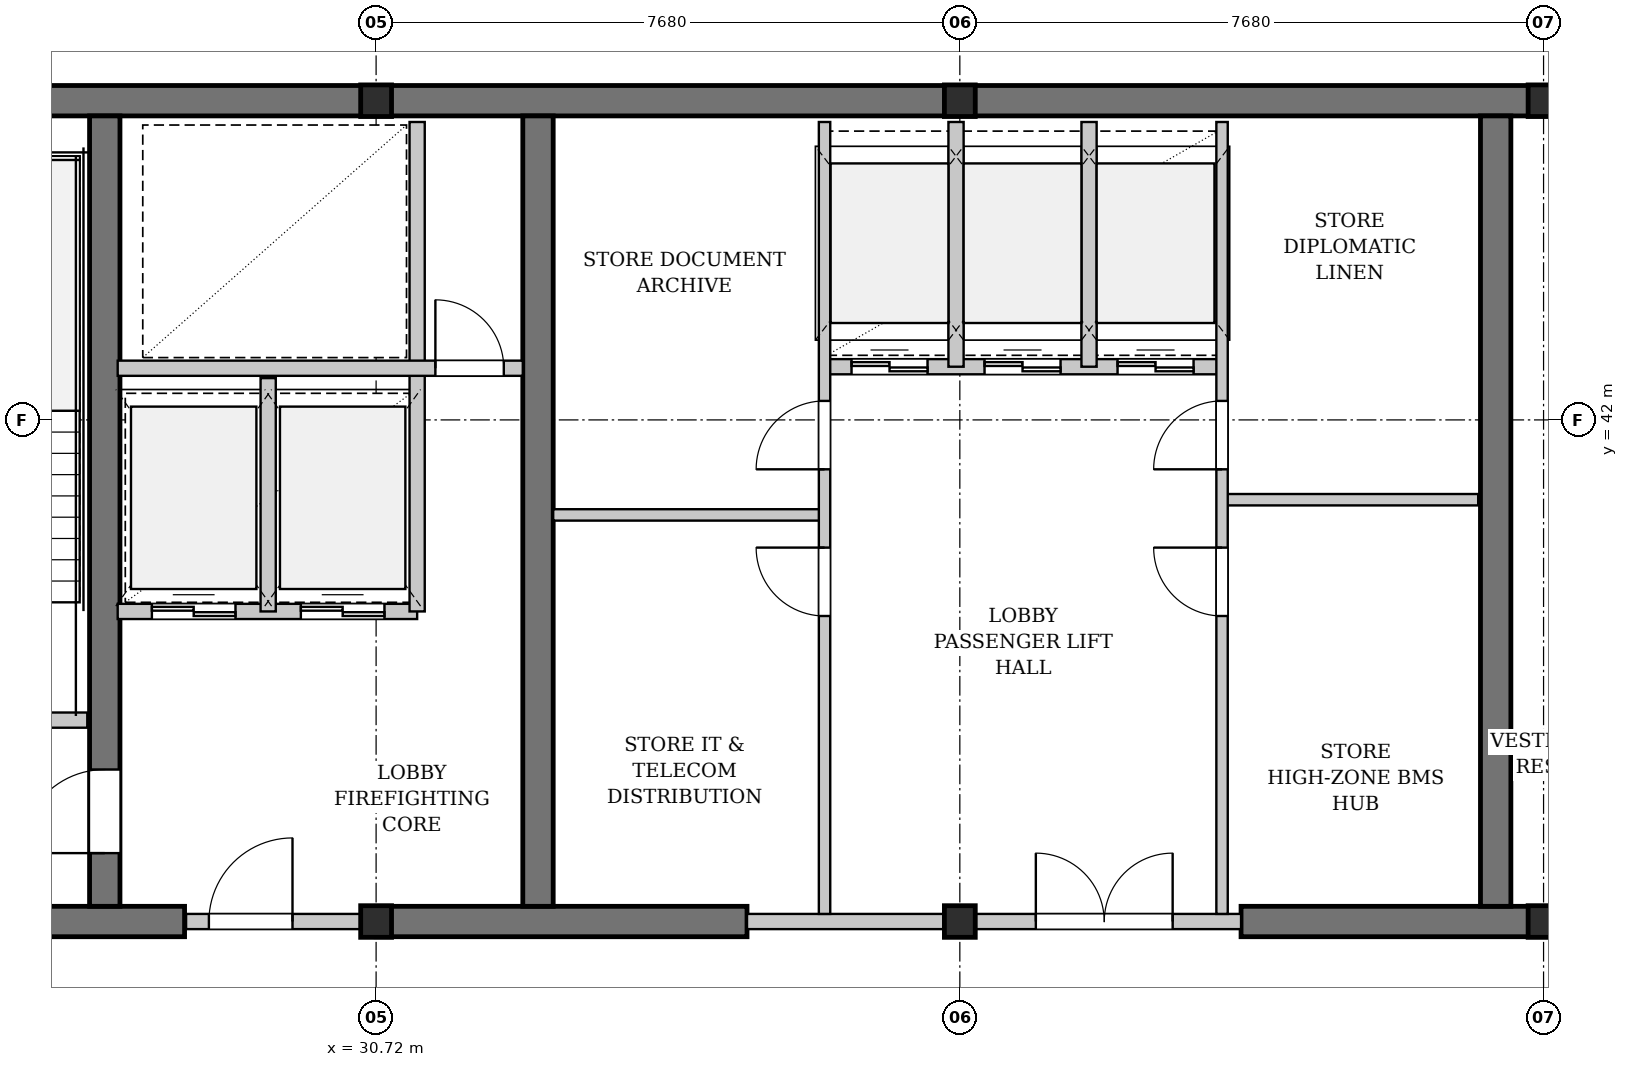
"""IFC4 building model, lengths in metres.
Left out: names, types, materials, properties, quantities, classifications, styles, units other than length and angle.
Written with IfcOpenShell. Run it as: python <this file> out.ifc"""

import sys

from ifc_helpers import new_model, si_unit, direction, frame, frame_2d, origin, origin_2d, place, context, subcontext, project, spatial, rectangle, i_section, extrude, element, fill, save


model = new_model("IFC4")
c1 = context("Model", 3, precision=1e-05, world=origin(), true_north=direction((0.0, 1.0)))
c2 = subcontext(c1, "Body", "Model", "MODEL_VIEW")
j1 = project(units=[si_unit("LENGTHUNIT", "METRE"), si_unit("PLANEANGLEUNIT", "RADIAN")], contexts=[c1])
p1 = place(None, origin())
s1 = spatial("IfcSite", under=j1, at=p1, CompositionType="ELEMENT")
p2 = place(p1, origin())
s2 = spatial("IfcBuilding", under=s1, at=p2, CompositionType="ELEMENT")
p3 = place(p2, frame((0.0, 0.0, 265.9)))
s3 = spatial("IfcBuildingStorey", under=s2, at=p3, CompositionType="ELEMENT", Elevation=265.9)
p4 = place(p3, frame((22.84, 46.2, 0.0), z_axis=(0.0, 0.0, 1.0), x_axis=(1.0, 0.0, 0.0)))
e1 = element("IfcWall", 1, at=p4, inside=s3, PredefinedType="SHEAR", context=c2, shape_type="SweptSolid", body=[
    extrude(rectangle(XDim=31.12, YDim=0.4, at=frame_2d((15.56, 0.0))), origin(), (0.0, 0.0, 1.0), 3.18),
])
p5 = place(p3, frame((22.84, 35.4, 0.0), z_axis=(0.0, 0.0, 1.0), x_axis=(1.0, 0.0, 0.0)))
e2 = element("IfcWall", 2, at=p5, inside=s3, PredefinedType="SHEAR", context=c2, shape_type="SweptSolid", body=[
    extrude(rectangle(XDim=5.36, YDim=0.4, at=frame_2d((2.68, 0.0))), origin(), (0.0, 0.0, 1.0), 3.18),
])
p6 = place(p3, frame((30.72, 35.4, 0.0), z_axis=(0.0, 0.0, 1.0), x_axis=(1.0, 0.0, 0.0)))
e3 = element("IfcWall", 3, at=p6, inside=s3, PredefinedType="SHEAR", context=c2, shape_type="SweptSolid", body=[
    extrude(rectangle(XDim=4.88, YDim=0.4, at=frame_2d((2.44, 0.0))), origin(), (0.0, 0.0, 1.0), 3.18),
])
p7 = place(p3, frame((42.1, 35.4, 0.0), z_axis=(0.0, 0.0, 1.0), x_axis=(1.0, 0.0, 0.0)))
e4 = element("IfcWall", 4, at=p7, inside=s3, PredefinedType="SHEAR", context=c2, shape_type="SweptSolid", body=[
    extrude(rectangle(XDim=8.05, YDim=0.4, at=frame_2d((4.025, 0.0))), origin(), (0.0, 0.0, 1.0), 3.18),
])
p8 = place(p7, frame((4.85, 0.0, 0.0)))
e5 = element("IfcOpeningElement", 5, at=p8, cuts=e4, PredefinedType="OPENING", context=c2, shape_type="SweptSolid", body=[
    extrude(rectangle(XDim=0.9, YDim=2.15, at=frame_2d((0.45, 1.075))), frame((0.0, 0.21, 0.0), z_axis=(0.0, -1.0, 0.0), x_axis=(1.0, 0.0, 0.0)), (0.0, 0.0, 1.0), 0.42),
])
p9 = place(p3, frame((27.15, 35.6, 0.0), z_axis=(0.0, 0.0, 1.0), x_axis=(0.0, 1.0, 0.0)))
e6 = element("IfcWall", 6, at=p9, inside=s3, PredefinedType="SHEAR", context=c2, shape_type="SweptSolid", body=[
    extrude(rectangle(XDim=10.4, YDim=0.4, at=frame_2d((5.2, 0.0))), origin(), (0.0, 0.0, 1.0), 3.18),
])
p10 = place(p9, frame((0.7, 0.0, 0.0)))
e7 = element("IfcOpeningElement", 7, at=p10, cuts=e6, PredefinedType="OPENING", context=c2, shape_type="SweptSolid", body=[
    extrude(rectangle(XDim=1.1, YDim=2.15, at=frame_2d((0.55, 1.075))), frame((0.0, 0.21, 0.0), z_axis=(0.0, -1.0, 0.0), x_axis=(1.0, 0.0, 0.0)), (0.0, 0.0, 1.0), 0.42),
])
for number, where, z_axis, x_axis in (
    (8, (32.85, 35.6, 0.0), (0.0, 0.0, 1.0), (0.0, 1.0, 0.0)),
    (9, (45.45, 35.6, 0.0), (0.0, 0.0, 1.0), (0.0, 1.0, 0.0)),
):
    element("IfcWall", number, at=place(p3, frame(where, z_axis=z_axis, x_axis=x_axis)), inside=s3, PredefinedType="SHEAR", context=c2, shape_type="SweptSolid", body=[
        extrude(rectangle(XDim=10.4, YDim=0.4, at=frame_2d((5.2, 0.0))), origin(), (0.0, 0.0, 1.0), 3.18),
    ])
for number, where, z_axis, x_axis in (
    (10, (30.72, 35.4, 0.0), (0.0, 0.0, 1.0), (1.0, 0.0, 0.0)),
    (11, (30.72, 46.2, 0.0), (0.0, 0.0, 1.0), (1.0, 0.0, 0.0)),
    (12, (38.4, 35.4, 0.0), (0.0, 0.0, 1.0), (1.0, 0.0, 0.0)),
    (13, (38.4, 46.2, 0.0), (0.0, 0.0, 1.0), (1.0, 0.0, 0.0)),
    (14, (46.08, 35.4, 0.0), (0.0, 0.0, 1.0), (1.0, 0.0, 0.0)),
    (15, (46.08, 46.2, 0.0), (0.0, 0.0, 1.0), (1.0, 0.0, 0.0)),
):
    element("IfcColumn", number, at=place(p3, frame(where, z_axis=z_axis, x_axis=x_axis)), inside=s3, PredefinedType="COLUMN", context=c2, shape_type="SweptSolid", body=[
        extrude(i_section(OverallWidth=0.406, OverallDepth=0.416, WebThickness=0.03, FlangeThickness=0.048, FilletRadius=0.015, at=origin_2d()), origin(), (0.0, 0.0, 1.0), 3.4),
    ])
p11 = place(p3, frame((23.3, 38.05, 0.0), z_axis=(0.0, 0.0, 1.0), x_axis=(1.0, 0.0, 0.0)))
e16 = element("IfcWall", 16, at=p11, inside=s3, PredefinedType="PARTITIONING", context=c2, shape_type="SweptSolid", body=[
    extrude(rectangle(XDim=3.62, YDim=0.2, at=frame_2d((1.81, 0.0))), origin(), (0.0, 0.0, 1.0), 3.18),
])
p12 = place(p11, frame((1.26, 0.0, 0.0)))
e17 = element("IfcOpeningElement", 17, at=p12, cuts=e16, PredefinedType="OPENING", context=c2, shape_type="SweptSolid", body=[
    extrude(rectangle(XDim=1.1, YDim=2.15, at=frame_2d((0.55, 1.075))), frame((0.0, 0.11, 0.0), z_axis=(0.0, -1.0, 0.0), x_axis=(1.0, 0.0, 0.0)), (0.0, 0.0, 1.0), 0.22),
])
p13 = place(p3, frame((28.22, 35.4, 0.0), z_axis=(0.0, 0.0, 1.0), x_axis=(1.0, 0.0, 0.0)))
e18 = element("IfcWall", 18, at=p13, inside=s3, PredefinedType="PARTITIONING", context=c2, shape_type="SweptSolid", body=[
    extrude(rectangle(XDim=2.5, YDim=0.2, at=frame_2d((1.25, 0.0))), origin(), (0.0, 0.0, 1.0), 2.575),
])
p14 = place(p13, frame((0.3, 0.0, 0.0)))
e19 = element("IfcOpeningElement", 19, at=p14, cuts=e18, PredefinedType="OPENING", context=c2, shape_type="SweptSolid", body=[
    extrude(rectangle(XDim=1.1, YDim=2.15, at=frame_2d((0.55, 1.075))), frame((0.0, 0.11, 0.0), z_axis=(0.0, -1.0, 0.0), x_axis=(1.0, 0.0, 0.0)), (0.0, 0.0, 1.0), 0.22),
])
p15 = place(p3, frame((27.32, 39.48, 0.0), z_axis=(0.0, 0.0, 1.0), x_axis=(1.0, 0.0, 0.0)))
e20 = element("IfcWall", 20, at=p15, inside=s3, PredefinedType="PARTITIONING", context=c2, shape_type="SweptSolid", body=[
    extrude(rectangle(XDim=3.94, YDim=0.2, at=frame_2d((1.97, 0.0))), origin(), (0.0, 0.0, 1.0), 3.18),
])
p16 = place(p15, frame((0.45, 0.0, 0.0)))
e21 = element("IfcOpeningElement", 21, at=p16, cuts=e20, PredefinedType="OPENING", context=c2, shape_type="SweptSolid", body=[
    extrude(rectangle(XDim=1.1, YDim=2.2, at=frame_2d((0.55, 1.1))), frame((0.0, 0.11, 0.0), z_axis=(0.0, -1.0, 0.0), x_axis=(1.0, 0.0, 0.0)), (0.0, 0.0, 1.0), 0.22),
])
p17 = place(p15, frame((2.41, 0.0, 0.0)))
e22 = element("IfcOpeningElement", 22, at=p17, cuts=e20, PredefinedType="OPENING", context=c2, shape_type="SweptSolid", body=[
    extrude(rectangle(XDim=1.1, YDim=2.2, at=frame_2d((0.55, 1.1))), frame((0.0, 0.11, 0.0), z_axis=(0.0, -1.0, 0.0), x_axis=(1.0, 0.0, 0.0)), (0.0, 0.0, 1.0), 0.22),
])
p18 = place(p3, frame((29.3, 39.48, 0.0), z_axis=(0.0, 0.0, 1.0), x_axis=(0.0, 1.0, 0.0)))
e23 = element("IfcWall", 23, at=p18, inside=s3, PredefinedType="PARTITIONING", context=c2, shape_type="SweptSolid", body=[
    extrude(rectangle(XDim=3.07, YDim=0.2, at=frame_2d((1.535, 0.0))), origin(), (0.0, 0.0, 1.0), 3.18),
])
p19 = place(p3, frame((31.26, 39.48, 0.0), z_axis=(0.0, 0.0, 1.0), x_axis=(0.0, 1.0, 0.0)))
e24 = element("IfcWall", 24, at=p19, inside=s3, PredefinedType="PARTITIONING", context=c2, shape_type="SweptSolid", body=[
    extrude(rectangle(XDim=6.44, YDim=0.2, at=frame_2d((3.22, 0.0))), origin(), (0.0, 0.0, 1.0), 3.18),
])
p20 = place(p3, frame((27.32, 42.68, 0.0), z_axis=(0.0, 0.0, 1.0), x_axis=(1.0, 0.0, 0.0)))
e25 = element("IfcWall", 25, at=p20, inside=s3, PredefinedType="PARTITIONING", context=c2, shape_type="SweptSolid", body=[
    extrude(rectangle(XDim=5.33, YDim=0.2, at=frame_2d((2.665, 0.0))), origin(), (0.0, 0.0, 1.0), 3.18),
])
p21 = place(p20, frame((4.18, 0.0, 0.0)))
e26 = element("IfcOpeningElement", 26, at=p21, cuts=e25, PredefinedType="OPENING", context=c2, shape_type="SweptSolid", body=[
    extrude(rectangle(XDim=0.9, YDim=2.15, at=frame_2d((0.45, 1.075))), frame((0.0, 0.11, 0.0), z_axis=(0.0, -1.0, 0.0), x_axis=(1.0, 0.0, 0.0)), (0.0, 0.0, 1.0), 0.22),
])
p22 = place(p3, frame((35.6, 35.4, 0.0), z_axis=(0.0, 0.0, 1.0), x_axis=(1.0, 0.0, 0.0)))
e27 = element("IfcWall", 27, at=p22, inside=s3, PredefinedType="PARTITIONING", context=c2, shape_type="SweptSolid", body=[
    extrude(rectangle(XDim=6.5, YDim=0.2, at=frame_2d((3.25, 0.0))), origin(), (0.0, 0.0, 1.0), 2.575),
])
p23 = place(p22, frame((3.8, 0.0, 0.0)))
e28 = element("IfcOpeningElement", 28, at=p23, cuts=e27, PredefinedType="OPENING", context=c2, shape_type="SweptSolid", body=[
    extrude(rectangle(XDim=1.8, YDim=2.3, at=frame_2d((0.9, 1.15))), frame((0.0, 0.11, 0.0), z_axis=(0.0, -1.0, 0.0), x_axis=(1.0, 0.0, 0.0)), (0.0, 0.0, 1.0), 0.22),
])
p24 = place(p3, frame((36.6, 42.7, 0.0), z_axis=(0.0, 0.0, 1.0), x_axis=(1.0, 0.0, 0.0)))
e29 = element("IfcWall", 29, at=p24, inside=s3, PredefinedType="PARTITIONING", context=c2, shape_type="SweptSolid", body=[
    extrude(rectangle(XDim=5.25, YDim=0.2, at=frame_2d((2.625, 0.0))), origin(), (0.0, 0.0, 1.0), 3.18),
])
p25 = place(p24, frame((0.375, 0.0, 0.0)))
e30 = element("IfcOpeningElement", 30, at=p25, cuts=e29, PredefinedType="OPENING", context=c2, shape_type="SweptSolid", body=[
    extrude(rectangle(XDim=1.0, YDim=2.2, at=frame_2d((0.5, 1.1))), frame((0.0, 0.11, 0.0), z_axis=(0.0, -1.0, 0.0), x_axis=(1.0, 0.0, 0.0)), (0.0, 0.0, 1.0), 0.22),
])
p26 = place(p24, frame((2.125, 0.0, 0.0)))
e31 = element("IfcOpeningElement", 31, at=p26, cuts=e29, PredefinedType="OPENING", context=c2, shape_type="SweptSolid", body=[
    extrude(rectangle(XDim=1.0, YDim=2.2, at=frame_2d((0.5, 1.1))), frame((0.0, 0.11, 0.0), z_axis=(0.0, -1.0, 0.0), x_axis=(1.0, 0.0, 0.0)), (0.0, 0.0, 1.0), 0.22),
])
p27 = place(p24, frame((3.875, 0.0, 0.0)))
e32 = element("IfcOpeningElement", 32, at=p27, cuts=e29, PredefinedType="OPENING", context=c2, shape_type="SweptSolid", body=[
    extrude(rectangle(XDim=1.0, YDim=2.2, at=frame_2d((0.5, 1.1))), frame((0.0, 0.11, 0.0), z_axis=(0.0, -1.0, 0.0), x_axis=(1.0, 0.0, 0.0)), (0.0, 0.0, 1.0), 0.22),
])
p28 = place(p3, frame((38.35, 42.7, 0.0), z_axis=(0.0, 0.0, 1.0), x_axis=(0.0, 1.0, 0.0)))
e33 = element("IfcWall", 33, at=p28, inside=s3, PredefinedType="PARTITIONING", context=c2, shape_type="SweptSolid", body=[
    extrude(rectangle(XDim=3.22, YDim=0.2, at=frame_2d((1.61, 0.0))), origin(), (0.0, 0.0, 1.0), 2.575),
])
p29 = place(p3, frame((40.1, 42.7, 0.0), z_axis=(0.0, 0.0, 1.0), x_axis=(0.0, 1.0, 0.0)))
e34 = element("IfcWall", 34, at=p29, inside=s3, PredefinedType="PARTITIONING", context=c2, shape_type="SweptSolid", body=[
    extrude(rectangle(XDim=3.22, YDim=0.2, at=frame_2d((1.61, 0.0))), origin(), (0.0, 0.0, 1.0), 3.18),
])
p30 = place(p3, frame((33.05, 40.75, 0.0), z_axis=(0.0, 0.0, 1.0), x_axis=(1.0, 0.0, 0.0)))
e35 = element("IfcWall", 35, at=p30, inside=s3, PredefinedType="PARTITIONING", context=c2, shape_type="SweptSolid", body=[
    extrude(rectangle(XDim=3.57, YDim=0.15, at=frame_2d((1.785, 0.0))), origin(), (0.0, 0.0, 1.0), 3.18),
])
p31 = place(p3, frame((36.62, 35.5, 0.0), z_axis=(0.0, 0.0, 1.0), x_axis=(0.0, 1.0, 0.0)))
e36 = element("IfcWall", 36, at=p31, inside=s3, PredefinedType="PARTITIONING", context=c2, shape_type="SweptSolid", body=[
    extrude(rectangle(XDim=10.42, YDim=0.15, at=frame_2d((5.21, 0.0))), origin(), (0.0, 0.0, 1.0), 3.18),
])
p32 = place(p31, frame((3.92, 0.0, 0.0)))
e37 = element("IfcOpeningElement", 37, at=p32, cuts=e36, PredefinedType="OPENING", context=c2, shape_type="SweptSolid", body=[
    extrude(rectangle(XDim=0.9, YDim=2.15, at=frame_2d((0.45, 1.075))), frame((0.0, 0.085, 0.0), z_axis=(0.0, -1.0, 0.0), x_axis=(1.0, 0.0, 0.0)), (0.0, 0.0, 1.0), 0.17),
])
p33 = place(p31, frame((5.85, 0.0, 0.0)))
e38 = element("IfcOpeningElement", 38, at=p33, cuts=e36, PredefinedType="OPENING", context=c2, shape_type="SweptSolid", body=[
    extrude(rectangle(XDim=0.9, YDim=2.15, at=frame_2d((0.45, 1.075))), frame((0.0, 0.085, 0.0), z_axis=(0.0, -1.0, 0.0), x_axis=(1.0, 0.0, 0.0)), (0.0, 0.0, 1.0), 0.17),
])
p34 = place(p3, frame((41.85, 40.95, 0.0), z_axis=(0.0, 0.0, 1.0), x_axis=(1.0, 0.0, 0.0)))
e39 = element("IfcWall", 39, at=p34, inside=s3, PredefinedType="PARTITIONING", context=c2, shape_type="SweptSolid", body=[
    extrude(rectangle(XDim=3.37, YDim=0.15, at=frame_2d((1.685, 0.0))), origin(), (0.0, 0.0, 1.0), 3.18),
])
p35 = place(p3, frame((41.85, 35.5, 0.0), z_axis=(0.0, 0.0, 1.0), x_axis=(0.0, 1.0, 0.0)))
e40 = element("IfcWall", 40, at=p35, inside=s3, PredefinedType="PARTITIONING", context=c2, shape_type="SweptSolid", body=[
    extrude(rectangle(XDim=10.42, YDim=0.15, at=frame_2d((5.21, 0.0))), origin(), (0.0, 0.0, 1.0), 3.18),
])
p36 = place(p35, frame((3.92, 0.0, 0.0)))
e41 = element("IfcOpeningElement", 41, at=p36, cuts=e40, PredefinedType="OPENING", context=c2, shape_type="SweptSolid", body=[
    extrude(rectangle(XDim=0.9, YDim=2.15, at=frame_2d((0.45, 1.075))), frame((0.0, 0.085, 0.0), z_axis=(0.0, -1.0, 0.0), x_axis=(1.0, 0.0, 0.0)), (0.0, 0.0, 1.0), 0.17),
])
p37 = place(p35, frame((5.85, 0.0, 0.0)))
e42 = element("IfcOpeningElement", 42, at=p37, cuts=e40, PredefinedType="OPENING", context=c2, shape_type="SweptSolid", body=[
    extrude(rectangle(XDim=0.9, YDim=2.15, at=frame_2d((0.45, 1.075))), frame((0.0, 0.085, 0.0), z_axis=(0.0, -1.0, 0.0), x_axis=(1.0, 0.0, 0.0)), (0.0, 0.0, 1.0), 0.17),
])
p38 = place(p14, origin())
e43 = element("IfcDoor", 43, at=p38, inside=s3, OperationType="SINGLE_SWING_RIGHT", PredefinedType="DOOR", context=c2, shape_type="SweptSolid", body=[
    extrude(rectangle(XDim=1.1, YDim=2.15, at=frame_2d((0.55, 1.075))), frame((0.0, 0.025, 0.0), z_axis=(0.0, -1.0, 0.0), x_axis=(1.0, 0.0, 0.0)), (0.0, 0.0, 1.0), 0.05),
])
fill(e19, e43)
p39 = place(p16, origin())
e44 = element("IfcDoor", 44, at=p39, inside=s3, OperationType="DOUBLE_DOOR_SLIDING", PredefinedType="DOOR", context=c2, shape_type="SweptSolid", body=[
    extrude(rectangle(XDim=1.1, YDim=2.2, at=frame_2d((0.55, 1.1))), frame((0.0, 0.025, 0.0), z_axis=(0.0, -1.0, 0.0), x_axis=(1.0, 0.0, 0.0)), (0.0, 0.0, 1.0), 0.05),
])
fill(e21, e44)
p40 = place(p17, origin())
e45 = element("IfcDoor", 45, at=p40, inside=s3, OperationType="DOUBLE_DOOR_SLIDING", PredefinedType="DOOR", context=c2, shape_type="SweptSolid", body=[
    extrude(rectangle(XDim=1.1, YDim=2.2, at=frame_2d((0.55, 1.1))), frame((0.0, 0.025, 0.0), z_axis=(0.0, -1.0, 0.0), x_axis=(1.0, 0.0, 0.0)), (0.0, 0.0, 1.0), 0.05),
])
fill(e22, e45)
p41 = place(p21, origin())
e46 = element("IfcDoor", 46, at=p41, inside=s3, OperationType="SINGLE_SWING_LEFT", PredefinedType="DOOR", context=c2, shape_type="SweptSolid", body=[
    extrude(rectangle(XDim=0.9, YDim=2.15, at=frame_2d((0.45, 1.075))), frame((0.0, 0.025, 0.0), z_axis=(0.0, -1.0, 0.0), x_axis=(1.0, 0.0, 0.0)), (0.0, 0.0, 1.0), 0.05),
])
fill(e26, e46)
p42 = place(p23, origin())
e47 = element("IfcDoor", 47, at=p42, inside=s3, OperationType="DOUBLE_DOOR_SINGLE_SWING", PredefinedType="DOOR", context=c2, shape_type="SweptSolid", body=[
    extrude(rectangle(XDim=1.8, YDim=2.3, at=frame_2d((0.9, 1.15))), frame((0.0, 0.025, 0.0), z_axis=(0.0, -1.0, 0.0), x_axis=(1.0, 0.0, 0.0)), (0.0, 0.0, 1.0), 0.05),
])
fill(e28, e47)
p43 = place(p25, origin())
e48 = element("IfcDoor", 48, at=p43, inside=s3, OperationType="DOUBLE_DOOR_SLIDING", PredefinedType="DOOR", context=c2, shape_type="SweptSolid", body=[
    extrude(rectangle(XDim=1.0, YDim=2.2, at=frame_2d((0.5, 1.1))), frame((0.0, 0.025, 0.0), z_axis=(0.0, -1.0, 0.0), x_axis=(1.0, 0.0, 0.0)), (0.0, 0.0, 1.0), 0.05),
])
fill(e30, e48)
p44 = place(p26, origin())
e49 = element("IfcDoor", 49, at=p44, inside=s3, OperationType="DOUBLE_DOOR_SLIDING", PredefinedType="DOOR", context=c2, shape_type="SweptSolid", body=[
    extrude(rectangle(XDim=1.0, YDim=2.2, at=frame_2d((0.5, 1.1))), frame((0.0, 0.025, 0.0), z_axis=(0.0, -1.0, 0.0), x_axis=(1.0, 0.0, 0.0)), (0.0, 0.0, 1.0), 0.05),
])
fill(e31, e49)
p45 = place(p27, origin())
e50 = element("IfcDoor", 50, at=p45, inside=s3, OperationType="DOUBLE_DOOR_SLIDING", PredefinedType="DOOR", context=c2, shape_type="SweptSolid", body=[
    extrude(rectangle(XDim=1.0, YDim=2.2, at=frame_2d((0.5, 1.1))), frame((0.0, 0.025, 0.0), z_axis=(0.0, -1.0, 0.0), x_axis=(1.0, 0.0, 0.0)), (0.0, 0.0, 1.0), 0.05),
])
fill(e32, e50)
p46 = place(p32, origin())
e51 = element("IfcDoor", 51, at=p46, inside=s3, OperationType="SINGLE_SWING_RIGHT", PredefinedType="DOOR", context=c2, shape_type="SweptSolid", body=[
    extrude(rectangle(XDim=0.9, YDim=2.15, at=frame_2d((0.45, 1.075))), frame((0.0, 0.025, 0.0), z_axis=(0.0, -1.0, 0.0), x_axis=(1.0, 0.0, 0.0)), (0.0, 0.0, 1.0), 0.05),
])
fill(e37, e51)
p47 = place(p33, origin())
e52 = element("IfcDoor", 52, at=p47, inside=s3, OperationType="SINGLE_SWING_LEFT", PredefinedType="DOOR", context=c2, shape_type="SweptSolid", body=[
    extrude(rectangle(XDim=0.9, YDim=2.15, at=frame_2d((0.45, 1.075))), frame((0.0, 0.025, 0.0), z_axis=(0.0, -1.0, 0.0), x_axis=(1.0, 0.0, 0.0)), (0.0, 0.0, 1.0), 0.05),
])
fill(e38, e52)
p48 = place(p36, origin())
e53 = element("IfcDoor", 53, at=p48, inside=s3, OperationType="SINGLE_SWING_RIGHT", PredefinedType="DOOR", context=c2, shape_type="SweptSolid", body=[
    extrude(rectangle(XDim=0.9, YDim=2.15, at=frame_2d((0.45, 1.075))), frame((0.0, 0.025, 0.0), z_axis=(0.0, -1.0, 0.0), x_axis=(1.0, 0.0, 0.0)), (0.0, 0.0, 1.0), 0.05),
])
fill(e41, e53)
p49 = place(p37, origin())
e54 = element("IfcDoor", 54, at=p49, inside=s3, OperationType="SINGLE_SWING_LEFT", PredefinedType="DOOR", context=c2, shape_type="SweptSolid", body=[
    extrude(rectangle(XDim=0.9, YDim=2.15, at=frame_2d((0.45, 1.075))), frame((0.0, 0.025, 0.0), z_axis=(0.0, -1.0, 0.0), x_axis=(1.0, 0.0, 0.0)), (0.0, 0.0, 1.0), 0.05),
])
fill(e42, e54)
p50 = place(p10, origin())
e55 = element("IfcDoor", 55, at=p50, inside=s3, OperationType="SINGLE_SWING_LEFT", PredefinedType="DOOR", context=c2, shape_type="SweptSolid", body=[
    extrude(rectangle(XDim=1.1, YDim=2.15, at=frame_2d((0.55, 1.075))), frame((0.0, 0.025, 0.0), z_axis=(0.0, -1.0, 0.0), x_axis=(1.0, 0.0, 0.0)), (0.0, 0.0, 1.0), 0.05),
])
fill(e7, e55)
save(model, sys.argv[1])
